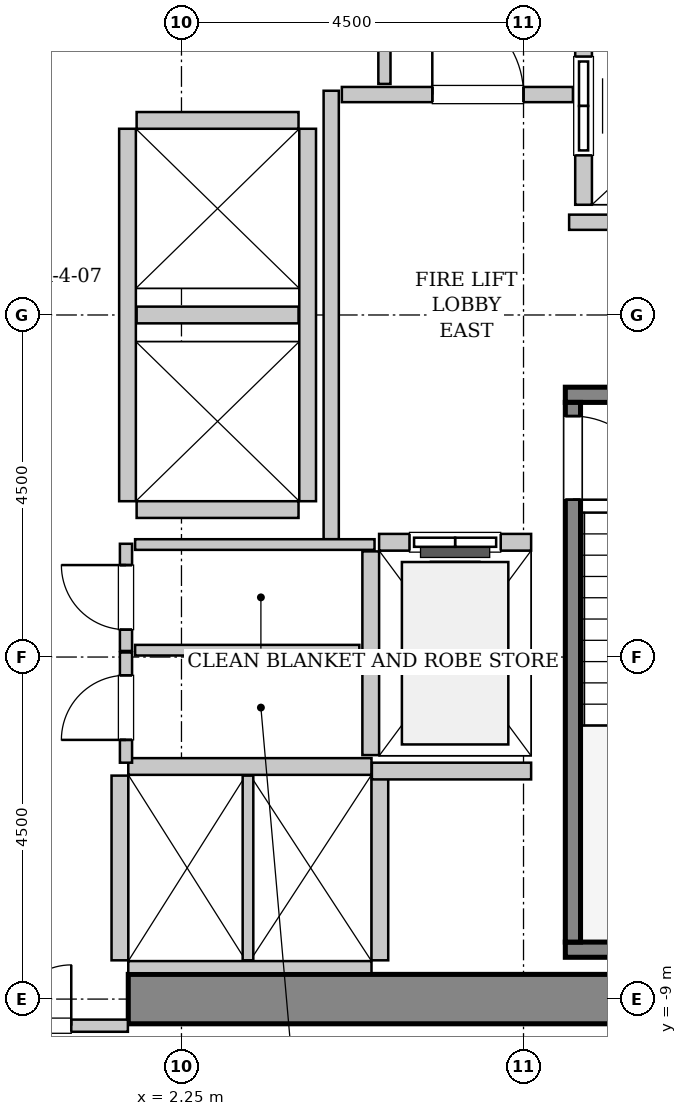
"""IFC4 building model, lengths in metres.
Left out: names, types, materials, properties, quantities, classifications, styles, units other than length and angle.
Written with IfcOpenShell. Run it as: python <this file> out.ifc"""

import sys

from ifc_helpers import new_model, si_unit, direction, frame, frame_2d, origin, place, context, subcontext, project, spatial, rectangle, extrude, source, transform, mapped, element, fill, save


model = new_model("IFC4")
c1 = context("Model", 3, precision=1e-05, world=origin(), true_north=direction((0.0, 1.0)))
c2 = subcontext(c1, "Body", "Model", "MODEL_VIEW")
j1 = project(units=[si_unit("LENGTHUNIT", "METRE"), si_unit("PLANEANGLEUNIT", "RADIAN")], contexts=[c1])
p1 = place(None, origin())
s1 = spatial("IfcSite", under=j1, at=p1, CompositionType="ELEMENT")
p2 = place(p1, origin())
s2 = spatial("IfcBuilding", under=s1, at=p2, CompositionType="ELEMENT")
p3 = place(p2, frame((0.0, 0.0, 59.6)))
s3 = spatial("IfcBuildingStorey", under=s2, at=p3, CompositionType="ELEMENT", Elevation=59.6)
m1 = source(origin(), c2, "Body", "SweptSolid", [
    extrude(rectangle(XDim=10.025, YDim=0.65, at=frame_2d((5.012, 0.0))), origin(), (0.0, 0.0, 1.0), 3.8),
])
p4 = place(p3, frame((1.55, -9.0, 0.0), z_axis=(0.0, 0.0, 1.0), x_axis=(1.0, 0.0, 0.0)))
e1 = element("IfcWall", 1, at=p4, inside=s3, PredefinedType="SHEAR", context=c2, shape_type="MappedRepresentation", body=[
    mapped(m1, transform((0.0, 0.0, 0.0), x_axis=(1.0, 0.0, 0.0), y_axis=(0.0, 1.0, 0.0), z_axis=(0.0, 0.0, 1.0), scale=1.0)),
])
m2 = source(origin(), c2, "Body", "SweptSolid", [
    extrude(rectangle(XDim=3.4, YDim=0.2, at=frame_2d((1.7, 0.0))), origin(), (0.0, 0.0, 1.0), 3.8),
])
p5 = place(p3, frame((7.3, -1.05, 0.0), z_axis=(0.0, 0.0, 1.0), x_axis=(1.0, 0.0, 0.0)))
e2 = element("IfcWall", 2, at=p5, inside=s3, PredefinedType="SOLIDWALL", context=c2, shape_type="MappedRepresentation", body=[
    mapped(m2, transform((0.0, 0.0, 0.0), x_axis=(1.0, 0.0, 0.0), y_axis=(0.0, 1.0, 0.0), z_axis=(0.0, 0.0, 1.0), scale=1.0)),
])
m3 = source(origin(), c2, "Body", "SweptSolid", [
    extrude(rectangle(XDim=3.63, YDim=0.2, at=frame_2d((1.815, 0.0))), origin(), (0.0, 0.0, 1.0), 3.8),
])
p6 = place(p3, frame((7.3, -8.35, 0.0), z_axis=(0.0, 0.0, 1.0), x_axis=(1.0, 0.0, 0.0)))
e3 = element("IfcWall", 3, at=p6, inside=s3, PredefinedType="SOLIDWALL", context=c2, shape_type="MappedRepresentation", body=[
    mapped(m3, transform((0.0, 0.0, 0.0), x_axis=(1.0, 0.0, 0.0), y_axis=(0.0, 1.0, 0.0), z_axis=(0.0, 0.0, 1.0), scale=1.0)),
])
m4 = source(origin(), c2, "Body", "SweptSolid", [
    extrude(rectangle(XDim=7.1, YDim=0.2, at=frame_2d((3.55, 0.0))), origin(), (0.0, 0.0, 1.0), 3.8),
])
p7 = place(p3, frame((7.4, -1.15, 0.0), z_axis=(0.0, 0.0, 1.0), x_axis=(0.0, -1.0, 0.0)))
e4 = element("IfcWall", 4, at=p7, inside=s3, PredefinedType="SOLIDWALL", context=c2, shape_type="MappedRepresentation", body=[
    mapped(m4, transform((0.0, 0.0, 0.0), x_axis=(1.0, 0.0, 0.0), y_axis=(0.0, 1.0, 0.0), z_axis=(0.0, 0.0, 1.0), scale=1.0)),
])
p8 = place(p7, frame((0.18, 0.0, 0.0)))
e5 = element("IfcOpeningElement", 5, at=p8, cuts=e4, PredefinedType="OPENING", context=c2, shape_type="SweptSolid", body=[
    extrude(rectangle(XDim=1.1, YDim=2.15, at=frame_2d((0.55, 1.075))), frame((0.0, 0.11, 0.0), z_axis=(0.0, -1.0, 0.0), x_axis=(1.0, 0.0, 0.0)), (0.0, 0.0, 1.0), 0.22),
])
m5 = source(origin(), c2, "Body", "SweptSolid", [
    extrude(rectangle(XDim=2.0, YDim=0.22, at=frame_2d((1.0, 0.0))), origin(), (0.0, 0.0, 1.0), 3.535),
])
p9 = place(p3, frame((6.85, -2.99, 0.0), z_axis=(0.0, 0.0, 1.0), x_axis=(-1.0, 0.0, 0.0)))
e6 = element("IfcWall", 6, at=p9, inside=s3, PredefinedType="SOLIDWALL", context=c2, shape_type="MappedRepresentation", body=[
    mapped(m5, transform((0.0, 0.0, 0.0), x_axis=(1.0, 0.0, 0.0), y_axis=(0.0, 1.0, 0.0), z_axis=(0.0, 0.0, 1.0), scale=1.0)),
])
p10 = place(p9, frame((0.4, 0.0, 0.0)))
e7 = element("IfcOpeningElement", 7, at=p10, cuts=e6, PredefinedType="OPENING", context=c2, shape_type="SweptSolid", body=[
    extrude(rectangle(XDim=1.2, YDim=2.2, at=frame_2d((0.6, 1.1))), frame((0.0, 0.12, 0.0), z_axis=(0.0, -1.0, 0.0), x_axis=(1.0, 0.0, 0.0)), (0.0, 0.0, 1.0), 0.24),
])
m6 = source(origin(), c2, "Body", "SweptSolid", [
    extrude(rectangle(XDim=2.68, YDim=0.22, at=frame_2d((1.34, 0.0))), origin(), (0.0, 0.0, 1.0), 3.535),
])
p11 = place(p3, frame((4.74, -3.11, 0.0), z_axis=(0.0, 0.0, 1.0), x_axis=(0.0, -1.0, 0.0)))
e8 = element("IfcWall", 8, at=p11, inside=s3, PredefinedType="SOLIDWALL", context=c2, shape_type="MappedRepresentation", body=[
    mapped(m6, transform((0.0, 0.0, 0.0), x_axis=(1.0, 0.0, 0.0), y_axis=(0.0, 1.0, 0.0), z_axis=(0.0, 0.0, 1.0), scale=1.0)),
])
m7 = source(origin(), c2, "Body", "SweptSolid", [
    extrude(rectangle(XDim=5.45, YDim=0.22, at=frame_2d((2.725, 0.0))), origin(), (0.0, 0.0, 1.0), 3.535),
])
p12 = place(p3, frame((7.54, 6.9, 0.0), z_axis=(0.0, 0.0, 1.0), x_axis=(0.0, -1.0, 0.0)))
e9 = element("IfcWall", 9, at=p12, inside=s3, PredefinedType="SOLIDWALL", context=c2, shape_type="MappedRepresentation", body=[
    mapped(m7, transform((0.0, 0.0, 0.0), x_axis=(1.0, 0.0, 0.0), y_axis=(0.0, 1.0, 0.0), z_axis=(0.0, 0.0, 1.0), scale=1.0)),
])
p13 = place(p12, frame((3.5, 0.0, 0.0)))
e10 = element("IfcOpeningElement", 10, at=p13, cuts=e9, PredefinedType="OPENING", context=c2, shape_type="SweptSolid", body=[
    extrude(rectangle(XDim=1.3, YDim=2.3, at=frame_2d((0.65, 1.15))), frame((0.0, 0.12, 0.0), z_axis=(0.0, -1.0, 0.0), x_axis=(1.0, 0.0, 0.0)), (0.0, 0.0, 1.0), 0.24),
])
p14 = place(p12, frame((0.65, 0.0, 0.0)))
e11 = element("IfcOpeningElement", 11, at=p14, cuts=e9, PredefinedType="OPENING", context=c2, shape_type="SweptSolid", body=[
    extrude(rectangle(XDim=1.3, YDim=2.3, at=frame_2d((0.65, 1.15))), frame((0.0, 0.12, 0.0), z_axis=(0.0, -1.0, 0.0), x_axis=(1.0, 0.0, 0.0)), (0.0, 0.0, 1.0), 0.24),
])
m8 = source(origin(), c2, "Body", "SweptSolid", [
    extrude(rectangle(XDim=3.2, YDim=0.22, at=frame_2d((1.6, 0.0))), origin(), (0.0, 0.0, 1.0), 3.535),
])
p15 = place(p3, frame((4.75, -5.94, 0.0), z_axis=(0.0, 0.0, 1.0), x_axis=(-1.0, 0.0, 0.0)))
e12 = element("IfcWall", 12, at=p15, inside=s3, PredefinedType="SOLIDWALL", context=c2, shape_type="MappedRepresentation", body=[
    mapped(m8, transform((0.0, 0.0, 0.0), x_axis=(1.0, 0.0, 0.0), y_axis=(0.0, 1.0, 0.0), z_axis=(0.0, 0.0, 1.0), scale=1.0)),
])
m9 = source(origin(), c2, "Body", "SweptSolid", [
    extrude(rectangle(XDim=3.2, YDim=0.16, at=frame_2d((1.6, 0.0))), origin(), (0.0, 0.0, 1.0), 2.425),
])
p16 = place(p3, frame((1.55, -8.58, 0.0), z_axis=(0.0, 0.0, 1.0), x_axis=(1.0, 0.0, 0.0)))
e13 = element("IfcWall", 13, at=p16, inside=s3, PredefinedType="PARTITIONING", context=c2, shape_type="MappedRepresentation", body=[
    mapped(m9, transform((0.0, 0.0, 0.0), x_axis=(1.0, 0.0, 0.0), y_axis=(0.0, 1.0, 0.0), z_axis=(0.0, 0.0, 1.0), scale=1.0)),
])
m10 = source(origin(), c2, "Body", "SweptSolid", [
    extrude(rectangle(XDim=2.43, YDim=0.22, at=frame_2d((1.215, 0.0))), origin(), (0.0, 0.0, 1.0), 3.535),
])
p17 = place(p3, frame((1.44, -6.06, 0.0), z_axis=(0.0, 0.0, 1.0), x_axis=(0.0, -1.0, 0.0)))
e14 = element("IfcWall", 14, at=p17, inside=s3, PredefinedType="SOLIDWALL", context=c2, shape_type="MappedRepresentation", body=[
    mapped(m10, transform((0.0, 0.0, 0.0), x_axis=(1.0, 0.0, 0.0), y_axis=(0.0, 1.0, 0.0), z_axis=(0.0, 0.0, 1.0), scale=1.0)),
])
m11 = source(origin(), c2, "Body", "SweptSolid", [
    extrude(rectangle(XDim=2.43, YDim=0.14, at=frame_2d((1.215, 0.0))), origin(), (0.0, 0.0, 1.0), 3.535),
])
p18 = place(p3, frame((3.125, -8.49, 0.0), z_axis=(0.0, 0.0, 1.0), x_axis=(0.0, 1.0, 0.0)))
e15 = element("IfcWall", 15, at=p18, inside=s3, PredefinedType="PARTITIONING", context=c2, shape_type="MappedRepresentation", body=[
    mapped(m11, transform((0.0, 0.0, 0.0), x_axis=(1.0, 0.0, 0.0), y_axis=(0.0, 1.0, 0.0), z_axis=(0.0, 0.0, 1.0), scale=1.0)),
])
p19 = place(p3, frame((4.86, -8.49, 0.0), z_axis=(0.0, 0.0, 1.0), x_axis=(0.0, 1.0, 0.0)))
e16 = element("IfcWall", 16, at=p19, inside=s3, PredefinedType="SOLIDWALL", context=c2, shape_type="MappedRepresentation", body=[
    mapped(m10, transform((0.0, 0.0, 0.0), x_axis=(1.0, 0.0, 0.0), y_axis=(0.0, 1.0, 0.0), z_axis=(0.0, 0.0, 1.0), scale=1.0)),
])
m12 = source(origin(), c2, "Body", "SweptSolid", [
    extrude(rectangle(XDim=4.9, YDim=0.22, at=frame_2d((2.45, 0.0))), origin(), (0.0, 0.0, 1.0), 3.535),
])
for number, where, z_axis, x_axis in (
    (17, (1.54, 2.45, 0.0), (0.0, 0.0, 1.0), (0.0, -1.0, 0.0)),
    (18, (3.91, -2.45, 0.0), (0.0, 0.0, 1.0), (0.0, 1.0, 0.0)),
):
    element("IfcWall", number, at=place(p3, frame(where, z_axis=z_axis, x_axis=x_axis)), inside=s3, PredefinedType="SOLIDWALL", context=c2, shape_type="MappedRepresentation", body=[
        mapped(m12, transform((0.0, 0.0, 0.0), x_axis=(1.0, 0.0, 0.0), y_axis=(0.0, 1.0, 0.0), z_axis=(0.0, 0.0, 1.0), scale=1.0)),
    ])
m13 = source(origin(), c2, "Body", "SweptSolid", [
    extrude(rectangle(XDim=2.13, YDim=0.22, at=frame_2d((1.065, 0.0))), origin(), (0.0, 0.0, 1.0), 3.535),
])
for number, where, z_axis, x_axis in (
    (19, (1.66, -2.56, 0.0), (0.0, 0.0, 1.0), (1.0, 0.0, 0.0)),
    (20, (1.66, 0.0, 0.0), (0.0, 0.0, 1.0), (1.0, 0.0, 0.0)),
    (21, (3.79, 2.56, 0.0), (0.0, 0.0, 1.0), (-1.0, 0.0, 0.0)),
):
    element("IfcWall", number, at=place(p3, frame(where, z_axis=z_axis, x_axis=x_axis)), inside=s3, PredefinedType="SOLIDWALL", context=c2, shape_type="MappedRepresentation", body=[
        mapped(m13, transform((0.0, 0.0, 0.0), x_axis=(1.0, 0.0, 0.0), y_axis=(0.0, 1.0, 0.0), z_axis=(0.0, 0.0, 1.0), scale=1.0)),
    ])
m14 = source(origin(), c2, "Body", "SweptSolid", [
    extrude(rectangle(XDim=2.095, YDim=0.22, at=frame_2d((1.048, 0.0))), origin(), (0.0, 0.0, 1.0), 3.535),
])
p20 = place(p3, frame((4.755, -6.0, 0.0), z_axis=(0.0, 0.0, 1.0), x_axis=(1.0, 0.0, 0.0)))
e22 = element("IfcWall", 22, at=p20, inside=s3, PredefinedType="SOLIDWALL", context=c2, shape_type="MappedRepresentation", body=[
    mapped(m14, transform((0.0, 0.0, 0.0), x_axis=(1.0, 0.0, 0.0), y_axis=(0.0, 1.0, 0.0), z_axis=(0.0, 0.0, 1.0), scale=1.0)),
])
m15 = source(origin(), c2, "Body", "SweptSolid", [
    extrude(rectangle(XDim=5.9, YDim=0.2, at=frame_2d((2.95, 0.0))), origin(), (0.0, 0.0, 1.0), 3.535),
])
p21 = place(p3, frame((4.22, -2.95, 0.0), z_axis=(0.0, 0.0, 1.0), x_axis=(0.0, 1.0, 0.0)))
e23 = element("IfcWall", 23, at=p21, inside=s3, PredefinedType="PARTITIONING", context=c2, shape_type="MappedRepresentation", body=[
    mapped(m15, transform((0.0, 0.0, 0.0), x_axis=(1.0, 0.0, 0.0), y_axis=(0.0, 1.0, 0.0), z_axis=(0.0, 0.0, 1.0), scale=1.0)),
])
m16 = source(origin(), c2, "Body", "SweptSolid", [
    extrude(rectangle(XDim=3.04, YDim=0.2, at=frame_2d((1.52, 0.0))), origin(), (0.0, 0.0, 1.0), 3.535),
])
p22 = place(p3, frame((4.36, 2.9, 0.0), z_axis=(0.0, 0.0, 1.0), x_axis=(1.0, 0.0, 0.0)))
e24 = element("IfcWall", 24, at=p22, inside=s3, PredefinedType="PARTITIONING", context=c2, shape_type="MappedRepresentation", body=[
    mapped(m16, transform((0.0, 0.0, 0.0), x_axis=(1.0, 0.0, 0.0), y_axis=(0.0, 1.0, 0.0), z_axis=(0.0, 0.0, 1.0), scale=1.0)),
])
p23 = place(p22, frame((1.19, 0.0, 0.0)))
e25 = element("IfcOpeningElement", 25, at=p23, cuts=e24, PredefinedType="OPENING", context=c2, shape_type="SweptSolid", body=[
    extrude(rectangle(XDim=1.2, YDim=2.15, at=frame_2d((0.6, 1.075))), frame((0.0, 0.11, 0.0), z_axis=(0.0, -1.0, 0.0), x_axis=(1.0, 0.0, 0.0)), (0.0, 0.0, 1.0), 0.22),
])
m17 = source(origin(), c2, "Body", "SweptSolid", [
    extrude(rectangle(XDim=4.11, YDim=0.2, at=frame_2d((2.055, 0.0))), origin(), (0.0, 0.0, 1.0), 3.535),
])
p24 = place(p3, frame((7.35, 1.22, 0.0), z_axis=(0.0, 0.0, 1.0), x_axis=(1.0, 0.0, 0.0)))
e26 = element("IfcWall", 26, at=p24, inside=s3, PredefinedType="PARTITIONING", context=c2, shape_type="MappedRepresentation", body=[
    mapped(m17, transform((0.0, 0.0, 0.0), x_axis=(1.0, 0.0, 0.0), y_axis=(0.0, 1.0, 0.0), z_axis=(0.0, 0.0, 1.0), scale=1.0)),
])
m18 = source(origin(), c2, "Body", "SweptSolid", [
    extrude(rectangle(XDim=3.09, YDim=0.16, at=frame_2d((1.545, 0.0))), origin(), (0.0, 0.0, 1.0), 2.425),
])
p25 = place(p3, frame((-1.545, -9.35, 0.0), z_axis=(0.0, 0.0, 1.0), x_axis=(1.0, 0.0, 0.0)))
e27 = element("IfcWall", 27, at=p25, inside=s3, PredefinedType="PARTITIONING", context=c2, shape_type="MappedRepresentation", body=[
    mapped(m18, transform((0.0, 0.0, 0.0), x_axis=(1.0, 0.0, 0.0), y_axis=(0.0, 1.0, 0.0), z_axis=(0.0, 0.0, 1.0), scale=1.0)),
])
p26 = place(p25, frame((0.745, 0.0, 0.0)))
e28 = element("IfcOpeningElement", 28, at=p26, cuts=e27, PredefinedType="OPENING", context=c2, shape_type="SweptSolid", body=[
    extrude(rectangle(XDim=1.6, YDim=2.3, at=frame_2d((0.8, 1.15))), frame((0.0, 0.09, 0.0), z_axis=(0.0, -1.0, 0.0), x_axis=(1.0, 0.0, 0.0)), (0.0, 0.0, 1.0), 0.18),
])
m19 = source(origin(), c2, "Body", "SweptSolid", [
    extrude(rectangle(XDim=3.015, YDim=0.16, at=frame_2d((1.507, 0.0))), origin(), (0.0, 0.0, 1.0), 3.535),
])
p27 = place(p3, frame((4.92, 3.04, 0.0), z_axis=(0.0, 0.0, 1.0), x_axis=(0.0, 1.0, 0.0)))
e29 = element("IfcWall", 29, at=p27, inside=s3, PredefinedType="PARTITIONING", context=c2, shape_type="MappedRepresentation", body=[
    mapped(m19, transform((0.0, 0.0, 0.0), x_axis=(1.0, 0.0, 0.0), y_axis=(0.0, 1.0, 0.0), z_axis=(0.0, 0.0, 1.0), scale=1.0)),
])
m20 = source(origin(), c2, "Body", "SweptSolid", [
    extrude(rectangle(XDim=1.41, YDim=0.16, at=frame_2d((0.705, 0.0))), origin(), (0.0, 0.0, 1.0), 3.535),
])
p28 = place(p3, frame((1.52, -4.42, 0.0), z_axis=(0.0, 0.0, 1.0), x_axis=(0.0, 1.0, 0.0)))
e30 = element("IfcWall", 30, at=p28, inside=s3, PredefinedType="PARTITIONING", context=c2, shape_type="MappedRepresentation", body=[
    mapped(m20, transform((0.0, 0.0, 0.0), x_axis=(1.0, 0.0, 0.0), y_axis=(0.0, 1.0, 0.0), z_axis=(0.0, 0.0, 1.0), scale=1.0)),
])
p29 = place(p28, frame((0.28, 0.0, 0.0)))
e31 = element("IfcOpeningElement", 31, at=p29, cuts=e30, PredefinedType="OPENING", context=c2, shape_type="SweptSolid", body=[
    extrude(rectangle(XDim=0.85, YDim=2.1, at=frame_2d((0.425, 1.05))), frame((0.0, 0.09, 0.0), z_axis=(0.0, -1.0, 0.0), x_axis=(1.0, 0.0, 0.0)), (0.0, 0.0, 1.0), 0.18),
])
m21 = source(origin(), c2, "Body", "SweptSolid", [
    extrude(rectangle(XDim=3.15, YDim=0.14, at=frame_2d((1.575, 0.0))), origin(), (0.0, 0.0, 1.0), 3.535),
])
p30 = place(p3, frame((1.64, -3.02, 0.0), z_axis=(0.0, 0.0, 1.0), x_axis=(1.0, 0.0, 0.0)))
e32 = element("IfcWall", 32, at=p30, inside=s3, PredefinedType="PARTITIONING", context=c2, shape_type="MappedRepresentation", body=[
    mapped(m21, transform((0.0, 0.0, 0.0), x_axis=(1.0, 0.0, 0.0), y_axis=(0.0, 1.0, 0.0), z_axis=(0.0, 0.0, 1.0), scale=1.0)),
])
m22 = source(origin(), c2, "Body", "SweptSolid", [
    extrude(rectangle(XDim=2.95, YDim=0.14, at=frame_2d((1.475, 0.0))), origin(), (0.0, 0.0, 1.0), 3.535),
])
p31 = place(p3, frame((1.64, -4.41, 0.0), z_axis=(0.0, 0.0, 1.0), x_axis=(1.0, 0.0, 0.0)))
e33 = element("IfcWall", 33, at=p31, inside=s3, PredefinedType="PARTITIONING", context=c2, shape_type="MappedRepresentation", body=[
    mapped(m22, transform((0.0, 0.0, 0.0), x_axis=(1.0, 0.0, 0.0), y_axis=(0.0, 1.0, 0.0), z_axis=(0.0, 0.0, 1.0), scale=1.0)),
])
m23 = source(origin(), c2, "Body", "SweptSolid", [
    extrude(rectangle(XDim=1.45, YDim=0.16, at=frame_2d((0.725, 0.0))), origin(), (0.0, 0.0, 1.0), 3.535),
])
p32 = place(p3, frame((1.52, -5.89, 0.0), z_axis=(0.0, 0.0, 1.0), x_axis=(0.0, 1.0, 0.0)))
e34 = element("IfcWall", 34, at=p32, inside=s3, PredefinedType="PARTITIONING", context=c2, shape_type="MappedRepresentation", body=[
    mapped(m23, transform((0.0, 0.0, 0.0), x_axis=(1.0, 0.0, 0.0), y_axis=(0.0, 1.0, 0.0), z_axis=(0.0, 0.0, 1.0), scale=1.0)),
])
p33 = place(p32, frame((0.3, 0.0, 0.0)))
e35 = element("IfcOpeningElement", 35, at=p33, cuts=e34, PredefinedType="OPENING", context=c2, shape_type="SweptSolid", body=[
    extrude(rectangle(XDim=0.85, YDim=2.1, at=frame_2d((0.425, 1.05))), frame((0.0, 0.09, 0.0), z_axis=(0.0, -1.0, 0.0), x_axis=(1.0, 0.0, 0.0)), (0.0, 0.0, 1.0), 0.18),
])
m24 = source(origin(), c2, "Body", "SweptSolid", [
    extrude(rectangle(XDim=1.1, YDim=2.15, at=frame_2d((0.55, 1.075))), frame((0.0, 0.025, 0.0), z_axis=(0.0, -1.0, 0.0), x_axis=(1.0, 0.0, 0.0)), (0.0, 0.0, 1.0), 0.05),
])
p34 = place(p8, origin())
e36 = element("IfcDoor", 36, at=p34, inside=s3, OperationType="SINGLE_SWING_RIGHT", PredefinedType="DOOR", context=c2, shape_type="MappedRepresentation", body=[
    mapped(m24, transform((0.0, 0.0, 0.0), x_axis=(1.0, 0.0, 0.0), y_axis=(0.0, 1.0, 0.0), z_axis=(0.0, 0.0, 1.0), scale=1.0)),
])
fill(e5, e36)
m25 = source(origin(), c2, "Body", "SweptSolid", [
    extrude(rectangle(XDim=1.2, YDim=2.2, at=frame_2d((0.6, 1.1))), frame((0.0, 0.025, 0.0), z_axis=(0.0, -1.0, 0.0), x_axis=(1.0, 0.0, 0.0)), (0.0, 0.0, 1.0), 0.05),
])
p35 = place(p10, origin())
e37 = element("IfcDoor", 37, at=p35, inside=s3, OperationType="SLIDING_TO_LEFT", PredefinedType="DOOR", context=c2, shape_type="MappedRepresentation", body=[
    mapped(m25, transform((0.0, 0.0, 0.0), x_axis=(1.0, 0.0, 0.0), y_axis=(0.0, 1.0, 0.0), z_axis=(0.0, 0.0, 1.0), scale=1.0)),
])
fill(e7, e37)
m26 = source(origin(), c2, "Body", "SweptSolid", [
    extrude(rectangle(XDim=1.3, YDim=2.3, at=frame_2d((0.65, 1.15))), frame((0.0, 0.025, 0.0), z_axis=(0.0, -1.0, 0.0), x_axis=(1.0, 0.0, 0.0)), (0.0, 0.0, 1.0), 0.05),
])
p36 = place(p13, origin())
e38 = element("IfcDoor", 38, at=p36, inside=s3, OperationType="SLIDING_TO_RIGHT", PredefinedType="DOOR", context=c2, shape_type="MappedRepresentation", body=[
    mapped(m26, transform((0.0, 0.0, 0.0), x_axis=(1.0, 0.0, 0.0), y_axis=(0.0, 1.0, 0.0), z_axis=(0.0, 0.0, 1.0), scale=1.0)),
])
fill(e10, e38)
m27 = source(origin(), c2, "Body", "SweptSolid", [
    extrude(rectangle(XDim=1.2, YDim=2.15, at=frame_2d((0.6, 1.075))), frame((0.0, 0.025, 0.0), z_axis=(0.0, -1.0, 0.0), x_axis=(1.0, 0.0, 0.0)), (0.0, 0.0, 1.0), 0.05),
])
p37 = place(p23, origin())
e39 = element("IfcDoor", 39, at=p37, inside=s3, OperationType="SINGLE_SWING_LEFT", PredefinedType="DOOR", context=c2, shape_type="MappedRepresentation", body=[
    mapped(m27, transform((0.0, 0.0, 0.0), x_axis=(1.0, 0.0, 0.0), y_axis=(0.0, 1.0, 0.0), z_axis=(0.0, 0.0, 1.0), scale=1.0)),
])
fill(e25, e39)
m28 = source(origin(), c2, "Body", "SweptSolid", [
    extrude(rectangle(XDim=1.6, YDim=2.3, at=frame_2d((0.8, 1.15))), frame((0.0, 0.025, 0.0), z_axis=(0.0, -1.0, 0.0), x_axis=(1.0, 0.0, 0.0)), (0.0, 0.0, 1.0), 0.05),
])
p38 = place(p26, origin())
e40 = element("IfcDoor", 40, at=p38, inside=s3, OperationType="DOUBLE_DOOR_SINGLE_SWING", PredefinedType="DOOR", context=c2, shape_type="MappedRepresentation", body=[
    mapped(m28, transform((0.0, 0.0, 0.0), x_axis=(1.0, 0.0, 0.0), y_axis=(0.0, 1.0, 0.0), z_axis=(0.0, 0.0, 1.0), scale=1.0)),
])
fill(e28, e40)
m29 = source(origin(), c2, "Body", "SweptSolid", [
    extrude(rectangle(XDim=0.85, YDim=2.1, at=frame_2d((0.425, 1.05))), frame((0.0, 0.025, 0.0), z_axis=(0.0, -1.0, 0.0), x_axis=(1.0, 0.0, 0.0)), (0.0, 0.0, 1.0), 0.05),
])
p39 = place(p29, origin())
e41 = element("IfcDoor", 41, at=p39, inside=s3, OperationType="SINGLE_SWING_RIGHT", PredefinedType="DOOR", context=c2, shape_type="MappedRepresentation", body=[
    mapped(m29, transform((0.0, 0.0, 0.0), x_axis=(1.0, 0.0, 0.0), y_axis=(0.0, 1.0, 0.0), z_axis=(0.0, 0.0, 1.0), scale=1.0)),
])
fill(e31, e41)
p40 = place(p33, origin())
e42 = element("IfcDoor", 42, at=p40, inside=s3, OperationType="SINGLE_SWING_LEFT", PredefinedType="DOOR", context=c2, shape_type="MappedRepresentation", body=[
    mapped(m29, transform((0.0, 0.0, 0.0), x_axis=(1.0, 0.0, 0.0), y_axis=(0.0, 1.0, 0.0), z_axis=(0.0, 0.0, 1.0), scale=1.0)),
])
fill(e35, e42)
save(model, sys.argv[1])
